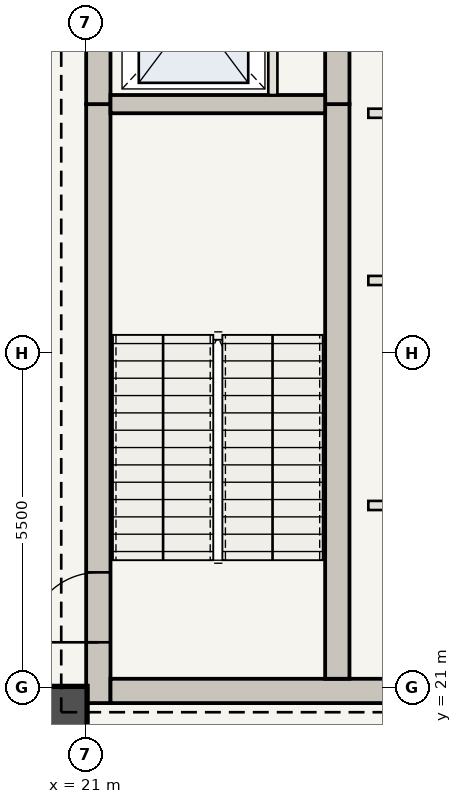
"""IFC4 building model, lengths in metres.
Left out: names, types, materials, properties, quantities, classifications, styles, units other than length and angle.
Written with IfcOpenShell. Run it as: python <this file> out.ifc"""

import sys

from ifc_helpers import new_model, si_unit, direction, frame, frame_2d, origin, origin_2d, place, context, subcontext, project, spatial, rectangle, extrude, element, fill, save


model = new_model("IFC4")
c1 = context("Model", 3, precision=1e-05, world=origin(), true_north=direction((0.0, 1.0)))
c2 = subcontext(c1, "Body", "Model", "MODEL_VIEW")
j1 = project(units=[si_unit("LENGTHUNIT", "METRE"), si_unit("PLANEANGLEUNIT", "RADIAN")], contexts=[c1])
p1 = place(None, origin())
s1 = spatial("IfcSite", under=j1, at=p1, CompositionType="ELEMENT")
p2 = place(p1, origin())
s2 = spatial("IfcBuilding", under=s1, at=p2, CompositionType="ELEMENT")
p3 = place(p2, frame((0.0, 0.0, 308.35)))
s3 = spatial("IfcBuildingStorey", under=s2, at=p3, CompositionType="ELEMENT", Elevation=308.35)
p4 = place(p3, frame((21.21, 20.75, 0.0), z_axis=(0.0, 0.0, 1.0), x_axis=(0.0, 1.0, 0.0)))
e1 = element("IfcWall", 1, at=p4, inside=s3, PredefinedType="SHEAR", context=c2, shape_type="SweptSolid", body=[
    extrude(rectangle(XDim=9.85, YDim=0.4, at=frame_2d((4.925, 0.0))), origin(), (0.0, 0.0, 1.0), 4.9),
])
p5 = place(p4, frame((1.0, 0.0, 0.0)))
e2 = element("IfcOpeningElement", 2, at=p5, cuts=e1, PredefinedType="OPENING", context=c2, shape_type="SweptSolid", body=[
    extrude(rectangle(XDim=1.15, YDim=2.15, at=frame_2d((0.575, 1.075))), frame((0.0, 0.21, 0.0), z_axis=(0.0, -1.0, 0.0), x_axis=(1.0, 0.0, 0.0)), (0.0, 0.0, 1.0), 0.42),
])
p6 = place(p3, frame((21.21, 30.6, 0.0), z_axis=(0.0, 0.0, 1.0), x_axis=(0.0, 1.0, 0.0)))
e3 = element("IfcWall", 3, at=p6, inside=s3, PredefinedType="SHEAR", context=c2, shape_type="SweptSolid", body=[
    extrude(rectangle(XDim=12.6, YDim=0.4, at=frame_2d((6.3, 0.0))), origin(), (0.0, 0.0, 1.0), 4.9),
])
p7 = place(p6, frame((4.2, 0.0, 0.0)))
e4 = element("IfcOpeningElement", 4, at=p7, cuts=e3, PredefinedType="OPENING", context=c2, shape_type="SweptSolid", body=[
    extrude(rectangle(XDim=1.1, YDim=2.15, at=frame_2d((0.55, 1.075))), frame((0.0, 0.21, 0.0), z_axis=(0.0, -1.0, 0.0), x_axis=(1.0, 0.0, 0.0)), (0.0, 0.0, 1.0), 0.42),
])
p8 = place(p6, frame((9.2, 0.0, 0.0)))
e5 = element("IfcOpeningElement", 5, at=p8, cuts=e3, PredefinedType="OPENING", context=c2, shape_type="SweptSolid", body=[
    extrude(rectangle(XDim=0.92, YDim=2.1, at=frame_2d((0.46, 1.05))), frame((0.0, 0.21, 0.0), z_axis=(0.0, -1.0, 0.0), x_axis=(1.0, 0.0, 0.0)), (0.0, 0.0, 1.0), 0.42),
])
p9 = place(p3, frame((21.41, 20.95, 0.0), z_axis=(0.0, 0.0, 1.0), x_axis=(1.0, 0.0, 0.0)))
e6 = element("IfcWall", 6, at=p9, inside=s3, PredefinedType="SHEAR", context=c2, shape_type="SweptSolid", body=[
    extrude(rectangle(XDim=13.74, YDim=0.4, at=frame_2d((6.87, 0.0))), origin(), (0.0, 0.0, 1.0), 4.9),
])
p10 = place(p3, frame((25.14, 21.15, 0.0), z_axis=(0.0, 0.0, 1.0), x_axis=(0.0, 1.0, 0.0)))
e7 = element("IfcWall", 7, at=p10, inside=s3, PredefinedType="SHEAR", context=c2, shape_type="SweptSolid", body=[
    extrude(rectangle(XDim=9.45, YDim=0.4, at=frame_2d((4.725, 0.0))), origin(), (0.0, 0.0, 1.0), 4.9),
])
p11 = place(p3, frame((25.14, 30.6, 0.0), z_axis=(0.0, 0.0, 1.0), x_axis=(0.0, 1.0, 0.0)))
e8 = element("IfcWall", 8, at=p11, inside=s3, PredefinedType="SHEAR", context=c2, shape_type="SweptSolid", body=[
    extrude(rectangle(XDim=12.2, YDim=0.4, at=frame_2d((6.1, 0.0))), origin(), (0.0, 0.0, 1.0), 4.9),
])
p12 = place(p11, frame((6.25, 0.0, 0.0)))
e9 = element("IfcOpeningElement", 9, at=p12, cuts=e8, PredefinedType="OPENING", context=c2, shape_type="SweptSolid", body=[
    extrude(rectangle(XDim=1.1, YDim=2.15, at=frame_2d((0.55, 1.075))), frame((0.0, 0.21, 0.0), z_axis=(0.0, -1.0, 0.0), x_axis=(1.0, 0.0, 0.0)), (0.0, 0.0, 1.0), 0.42),
])
p13 = place(p3, frame((20.65, 20.65, 0.0), z_axis=(0.0, 0.0, 1.0), x_axis=(1.0, 0.0, 0.0)))
e10 = element("IfcColumn", 10, at=p13, inside=s3, PredefinedType="COLUMN", context=c2, shape_type="SweptSolid", body=[
    extrude(rectangle(XDim=0.75, YDim=0.75, at=origin_2d()), origin(), (0.0, 0.0, 1.0), 4.9),
])
p14 = place(p3, frame((21.41, 30.6, 0.0), z_axis=(0.0, 0.0, 1.0), x_axis=(1.0, 0.0, 0.0)))
e11 = element("IfcWall", 11, at=p14, inside=s3, PredefinedType="SHEAR", context=c2, shape_type="SweptSolid", body=[
    extrude(rectangle(XDim=3.53, YDim=0.3, at=frame_2d((1.765, 0.0))), origin(), (0.0, 0.0, 1.0), 4.64),
])
p15 = place(p3, frame((24.08, 30.75, 0.0), z_axis=(0.0, 0.0, 1.0), x_axis=(0.0, 1.0, 0.0)))
e12 = element("IfcWall", 12, at=p15, inside=s3, PredefinedType="STANDARD", context=c2, shape_type="SweptSolid", body=[
    extrude(rectangle(XDim=2.65, YDim=0.15, at=frame_2d((1.325, 0.0))), origin(), (0.0, 0.0, 1.0), 4.64),
])
p16 = place(p3, frame((25.65, 24.0, 0.0), z_axis=(0.0, 0.0, 1.0), x_axis=(1.0, 0.0, 0.0)))
e13 = element("IfcWall", 13, at=p16, inside=s3, PredefinedType="STANDARD", context=c2, shape_type="SweptSolid", body=[
    extrude(rectangle(XDim=9.35, YDim=0.15, at=frame_2d((4.675, 0.0))), origin(), (0.0, 0.0, 1.0), 4.64),
])
p17 = place(p16, frame((1.35, 0.0, 0.0)))
e14 = element("IfcOpeningElement", 14, at=p17, cuts=e13, PredefinedType="OPENING", context=c2, shape_type="SweptSolid", body=[
    extrude(rectangle(XDim=0.95, YDim=2.15, at=frame_2d((0.475, 1.075))), frame((0.0, 0.085, 0.0), z_axis=(0.0, -1.0, 0.0), x_axis=(1.0, 0.0, 0.0)), (0.0, 0.0, 1.0), 0.17),
])
p18 = place(p16, frame((5.8, 0.0, 0.0)))
e15 = element("IfcOpeningElement", 15, at=p18, cuts=e13, PredefinedType="OPENING", context=c2, shape_type="SweptSolid", body=[
    extrude(rectangle(XDim=0.98, YDim=2.2, at=frame_2d((0.49, 1.1))), frame((0.0, 0.085, 0.0), z_axis=(0.0, -1.0, 0.0), x_axis=(1.0, 0.0, 0.0)), (0.0, 0.0, 1.0), 0.17),
])
p19 = place(p3, frame((25.65, 27.7, 0.0), z_axis=(0.0, 0.0, 1.0), x_axis=(1.0, 0.0, 0.0)))
e16 = element("IfcWall", 16, at=p19, inside=s3, PredefinedType="STANDARD", context=c2, shape_type="SweptSolid", body=[
    extrude(rectangle(XDim=9.35, YDim=0.15, at=frame_2d((4.675, 0.0))), origin(), (0.0, 0.0, 1.0), 4.64),
])
p20 = place(p19, frame((1.35, 0.0, 0.0)))
e17 = element("IfcOpeningElement", 17, at=p20, cuts=e16, PredefinedType="OPENING", context=c2, shape_type="SweptSolid", body=[
    extrude(rectangle(XDim=0.95, YDim=2.15, at=frame_2d((0.475, 1.075))), frame((0.0, 0.085, 0.0), z_axis=(0.0, -1.0, 0.0), x_axis=(1.0, 0.0, 0.0)), (0.0, 0.0, 1.0), 0.17),
])
p21 = place(p19, frame((6.4, 0.0, 0.0)))
e18 = element("IfcOpeningElement", 18, at=p21, cuts=e16, PredefinedType="OPENING", context=c2, shape_type="SweptSolid", body=[
    extrude(rectangle(XDim=0.98, YDim=2.2, at=frame_2d((0.49, 1.1))), frame((0.0, 0.085, 0.0), z_axis=(0.0, -1.0, 0.0), x_axis=(1.0, 0.0, 0.0)), (0.0, 0.0, 1.0), 0.17),
])
p22 = place(p3, frame((25.65, 30.45, 0.0), z_axis=(0.0, 0.0, 1.0), x_axis=(1.0, 0.0, 0.0)))
e19 = element("IfcWall", 19, at=p22, inside=s3, PredefinedType="STANDARD", context=c2, shape_type="SweptSolid", body=[
    extrude(rectangle(XDim=9.35, YDim=0.15, at=frame_2d((4.675, 0.0))), origin(), (0.0, 0.0, 1.0), 4.64),
])
p23 = place(p5, origin())
e20 = element("IfcDoor", 20, at=p23, inside=s3, OperationType="SINGLE_SWING_LEFT", PredefinedType="DOOR", context=c2, shape_type="SweptSolid", body=[
    extrude(rectangle(XDim=1.15, YDim=2.15, at=frame_2d((0.575, 1.075))), frame((0.0, 0.025, 0.0), z_axis=(0.0, -1.0, 0.0), x_axis=(1.0, 0.0, 0.0)), (0.0, 0.0, 1.0), 0.05),
])
fill(e2, e20)
save(model, sys.argv[1])
